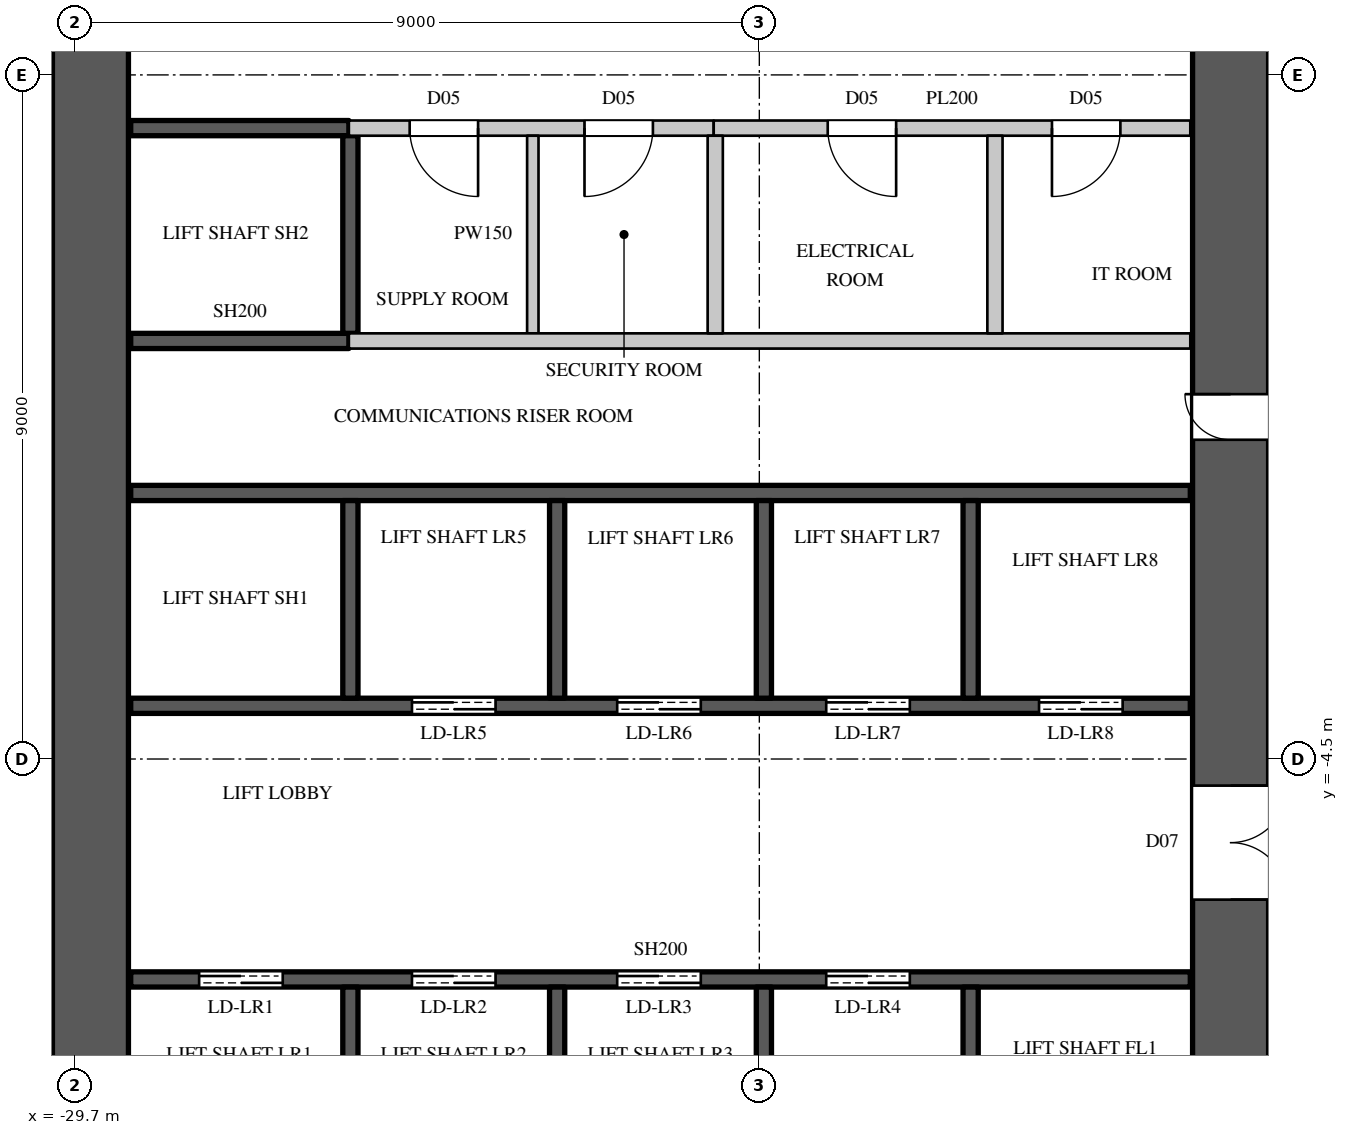
"""IFC4 building model, lengths in metres.
Left out: names, types, materials, properties, quantities, classifications, styles, units other than length and angle.
Written with IfcOpenShell. Run it as: python <this file> out.ifc"""

import sys

from ifc_helpers import new_model, si_unit, direction, frame, frame_2d, origin, place, context, subcontext, project, spatial, rectangle, extrude, element, fill, save


model = new_model("IFC4")
c1 = context("Model", 3, precision=1e-05, world=origin(), true_north=direction((0.0, 1.0)))
c2 = subcontext(c1, "Body", "Model", "MODEL_VIEW")
j1 = project(units=[si_unit("LENGTHUNIT", "METRE"), si_unit("PLANEANGLEUNIT", "RADIAN")], contexts=[c1])
p1 = place(None, origin())
s1 = spatial("IfcSite", under=j1, at=p1, CompositionType="ELEMENT")
p2 = place(p1, origin())
s2 = spatial("IfcBuilding", under=s1, at=p2, CompositionType="ELEMENT")
p3 = place(p2, frame((0.0, 0.0, 123.9)))
s3 = spatial("IfcBuildingStorey", under=s2, at=p3, CompositionType="ELEMENT", Elevation=123.9)
p4 = place(p3, frame((-14.5, -14.8, 0.0), z_axis=(0.0, 0.0, 1.0), x_axis=(0.0, 1.0, 0.0)))
e1 = element("IfcWall", 1, at=p4, inside=s3, PredefinedType="SHEAR", context=c2, shape_type="SweptSolid", body=[
    extrude(rectangle(XDim=29.6, YDim=1.0, at=frame_2d((14.8, 0.0))), origin(), (0.0, 0.0, 1.0), 3.6),
])
p5 = place(p4, frame((8.45, 0.0, 0.0)))
e2 = element("IfcOpeningElement", 2, at=p5, cuts=e1, PredefinedType="OPENING", context=c2, shape_type="SweptSolid", body=[
    extrude(rectangle(XDim=1.5, YDim=2.4, at=frame_2d((0.75, 1.2))), frame((0.0, 0.51, 0.0), z_axis=(0.0, -1.0, 0.0), x_axis=(1.0, 0.0, 0.0)), (0.0, 0.0, 1.0), 1.02),
])
p6 = place(p4, frame((19.65, 0.0, 0.0)))
e3 = element("IfcOpeningElement", 3, at=p6, cuts=e1, PredefinedType="OPENING", context=c2, shape_type="SweptSolid", body=[
    extrude(rectangle(XDim=1.5, YDim=2.4, at=frame_2d((0.75, 1.2))), frame((0.0, 0.51, 0.0), z_axis=(0.0, -1.0, 0.0), x_axis=(1.0, 0.0, 0.0)), (0.0, 0.0, 1.0), 1.02),
])
p7 = place(p4, frame((14.5, 0.0, 0.0)))
e4 = element("IfcOpeningElement", 4, at=p7, cuts=e1, PredefinedType="OPENING", context=c2, shape_type="SweptSolid", body=[
    extrude(rectangle(XDim=0.6, YDim=2.0, at=frame_2d((0.3, 1.0))), frame((0.0, 0.51, 0.0), z_axis=(0.0, -1.0, 0.0), x_axis=(1.0, 0.0, 0.0)), (0.0, 0.0, 1.0), 1.02),
])
p8 = place(p3, frame((-29.5, -10.2, 0.0), z_axis=(0.0, 0.0, 1.0), x_axis=(0.0, 1.0, 0.0)))
e5 = element("IfcWall", 5, at=p8, inside=s3, PredefinedType="SHEAR", context=c2, shape_type="SweptSolid", body=[
    extrude(rectangle(XDim=20.4, YDim=1.0, at=frame_2d((10.2, 0.0))), origin(), (0.0, 0.0, 1.0), 3.6),
])
p9 = place(p3, frame((-26.1, 3.8, 0.0), z_axis=(0.0, 0.0, 1.0), x_axis=(1.0, 0.0, 0.0)))
e6 = element("IfcWall", 6, at=p9, inside=s3, PredefinedType="PARTITIONING", context=c2, shape_type="SweptSolid", body=[
    extrude(rectangle(XDim=4.8, YDim=0.2, at=frame_2d((2.4, 0.0))), origin(), (0.0, 0.0, 1.0), 3.3),
])
p10 = place(p9, frame((0.8, 0.0, 0.0)))
e7 = element("IfcOpeningElement", 7, at=p10, cuts=e6, PredefinedType="OPENING", context=c2, shape_type="SweptSolid", body=[
    extrude(rectangle(XDim=0.9, YDim=2.2, at=frame_2d((0.45, 1.1))), frame((0.0, 0.11, 0.0), z_axis=(0.0, -1.0, 0.0), x_axis=(1.0, 0.0, 0.0)), (0.0, 0.0, 1.0), 0.22),
])
p11 = place(p9, frame((3.1, 0.0, 0.0)))
e8 = element("IfcOpeningElement", 8, at=p11, cuts=e6, PredefinedType="OPENING", context=c2, shape_type="SweptSolid", body=[
    extrude(rectangle(XDim=0.9, YDim=2.2, at=frame_2d((0.45, 1.1))), frame((0.0, 0.11, 0.0), z_axis=(0.0, -1.0, 0.0), x_axis=(1.0, 0.0, 0.0)), (0.0, 0.0, 1.0), 0.22),
])
p12 = place(p3, frame((-23.68, 1.1, 0.0), z_axis=(0.0, 0.0, 1.0), x_axis=(0.0, 1.0, 0.0)))
e9 = element("IfcWall", 9, at=p12, inside=s3, PredefinedType="PARTITIONING", context=c2, shape_type="SweptSolid", body=[
    extrude(rectangle(XDim=2.6, YDim=0.15, at=frame_2d((1.3, 0.0))), origin(), (0.0, 0.0, 1.0), 3.3),
])
p13 = place(p3, frame((-26.1, 1.0, 0.0), z_axis=(0.0, 0.0, 1.0), x_axis=(1.0, 0.0, 0.0)))
e10 = element("IfcWall", 10, at=p13, inside=s3, PredefinedType="PARTITIONING", context=c2, shape_type="SweptSolid", body=[
    extrude(rectangle(XDim=11.07, YDim=0.2, at=frame_2d((5.535, 0.0))), origin(), (0.0, 0.0, 1.0), 3.3),
])
p14 = place(p3, frame((-21.3, 3.8, 0.0), z_axis=(0.0, 0.0, 1.0), x_axis=(1.0, 0.0, 0.0)))
e11 = element("IfcWall", 11, at=p14, inside=s3, PredefinedType="PARTITIONING", context=c2, shape_type="SweptSolid", body=[
    extrude(rectangle(XDim=6.27, YDim=0.2, at=frame_2d((3.135, 0.0))), origin(), (0.0, 0.0, 1.0), 3.3),
])
p15 = place(p14, frame((1.5, 0.0, 0.0)))
e12 = element("IfcOpeningElement", 12, at=p15, cuts=e11, PredefinedType="OPENING", context=c2, shape_type="SweptSolid", body=[
    extrude(rectangle(XDim=0.9, YDim=2.2, at=frame_2d((0.45, 1.1))), frame((0.0, 0.11, 0.0), z_axis=(0.0, -1.0, 0.0), x_axis=(1.0, 0.0, 0.0)), (0.0, 0.0, 1.0), 0.22),
])
p16 = place(p14, frame((4.45, 0.0, 0.0)))
e13 = element("IfcOpeningElement", 13, at=p16, cuts=e11, PredefinedType="OPENING", context=c2, shape_type="SweptSolid", body=[
    extrude(rectangle(XDim=0.9, YDim=2.2, at=frame_2d((0.45, 1.1))), frame((0.0, 0.11, 0.0), z_axis=(0.0, -1.0, 0.0), x_axis=(1.0, 0.0, 0.0)), (0.0, 0.0, 1.0), 0.22),
])
for number, where, z_axis, x_axis in (
    (14, (-21.28, 1.1, 0.0), (0.0, 0.0, 1.0), (0.0, 1.0, 0.0)),
    (15, (-17.6, 1.1, 0.0), (0.0, 0.0, 1.0), (0.0, 1.0, 0.0)),
):
    element("IfcWall", number, at=place(p3, frame(where, z_axis=z_axis, x_axis=x_axis)), inside=s3, PredefinedType="PARTITIONING", context=c2, shape_type="SweptSolid", body=[
        extrude(rectangle(XDim=2.6, YDim=0.2, at=frame_2d((1.3, 0.0))), origin(), (0.0, 0.0, 1.0), 3.3),
    ])
p17 = place(p3, frame((-28.97, -7.4, 0.0), z_axis=(0.0, 0.0, 1.0), x_axis=(1.0, 0.0, 0.0)))
e16 = element("IfcWall", 16, at=p17, inside=s3, PredefinedType="SHEAR", context=c2, shape_type="SweptSolid", body=[
    extrude(rectangle(XDim=13.94, YDim=0.2, at=frame_2d((6.97, 0.0))), origin(), (0.0, 0.0, 1.0), 3.3),
])
p18 = place(p17, frame((0.9, 0.0, 0.0)))
e17 = element("IfcOpeningElement", 17, at=p18, cuts=e16, PredefinedType="OPENING", context=c2, shape_type="SweptSolid", body=[
    extrude(rectangle(XDim=1.1, YDim=2.2, at=frame_2d((0.55, 1.1))), frame((0.0, 0.11, 0.0), z_axis=(0.0, -1.0, 0.0), x_axis=(1.0, 0.0, 0.0)), (0.0, 0.0, 1.0), 0.22),
])
p19 = place(p17, frame((3.7, 0.0, 0.0)))
e18 = element("IfcOpeningElement", 18, at=p19, cuts=e16, PredefinedType="OPENING", context=c2, shape_type="SweptSolid", body=[
    extrude(rectangle(XDim=1.1, YDim=2.2, at=frame_2d((0.55, 1.1))), frame((0.0, 0.11, 0.0), z_axis=(0.0, -1.0, 0.0), x_axis=(1.0, 0.0, 0.0)), (0.0, 0.0, 1.0), 0.22),
])
p20 = place(p17, frame((6.4, 0.0, 0.0)))
e19 = element("IfcOpeningElement", 19, at=p20, cuts=e16, PredefinedType="OPENING", context=c2, shape_type="SweptSolid", body=[
    extrude(rectangle(XDim=1.1, YDim=2.2, at=frame_2d((0.55, 1.1))), frame((0.0, 0.11, 0.0), z_axis=(0.0, -1.0, 0.0), x_axis=(1.0, 0.0, 0.0)), (0.0, 0.0, 1.0), 0.22),
])
p21 = place(p17, frame((9.15, 0.0, 0.0)))
e20 = element("IfcOpeningElement", 20, at=p21, cuts=e16, PredefinedType="OPENING", context=c2, shape_type="SweptSolid", body=[
    extrude(rectangle(XDim=1.1, YDim=2.2, at=frame_2d((0.55, 1.1))), frame((0.0, 0.11, 0.0), z_axis=(0.0, -1.0, 0.0), x_axis=(1.0, 0.0, 0.0)), (0.0, 0.0, 1.0), 0.22),
])
p22 = place(p3, frame((-28.97, -3.8, 0.0), z_axis=(0.0, 0.0, 1.0), x_axis=(1.0, 0.0, 0.0)))
e21 = element("IfcWall", 21, at=p22, inside=s3, PredefinedType="SHEAR", context=c2, shape_type="SweptSolid", body=[
    extrude(rectangle(XDim=13.94, YDim=0.2, at=frame_2d((6.97, 0.0))), origin(), (0.0, 0.0, 1.0), 3.3),
])
p23 = place(p22, frame((3.7, 0.0, 0.0)))
e22 = element("IfcOpeningElement", 22, at=p23, cuts=e21, PredefinedType="OPENING", context=c2, shape_type="SweptSolid", body=[
    extrude(rectangle(XDim=1.1, YDim=2.2, at=frame_2d((0.55, 1.1))), frame((0.0, 0.11, 0.0), z_axis=(0.0, -1.0, 0.0), x_axis=(1.0, 0.0, 0.0)), (0.0, 0.0, 1.0), 0.22),
])
p24 = place(p22, frame((6.4, 0.0, 0.0)))
e23 = element("IfcOpeningElement", 23, at=p24, cuts=e21, PredefinedType="OPENING", context=c2, shape_type="SweptSolid", body=[
    extrude(rectangle(XDim=1.1, YDim=2.2, at=frame_2d((0.55, 1.1))), frame((0.0, 0.11, 0.0), z_axis=(0.0, -1.0, 0.0), x_axis=(1.0, 0.0, 0.0)), (0.0, 0.0, 1.0), 0.22),
])
p25 = place(p22, frame((9.15, 0.0, 0.0)))
e24 = element("IfcOpeningElement", 24, at=p25, cuts=e21, PredefinedType="OPENING", context=c2, shape_type="SweptSolid", body=[
    extrude(rectangle(XDim=1.1, YDim=2.2, at=frame_2d((0.55, 1.1))), frame((0.0, 0.11, 0.0), z_axis=(0.0, -1.0, 0.0), x_axis=(1.0, 0.0, 0.0)), (0.0, 0.0, 1.0), 0.22),
])
p26 = place(p22, frame((11.95, 0.0, 0.0)))
e25 = element("IfcOpeningElement", 25, at=p26, cuts=e21, PredefinedType="OPENING", context=c2, shape_type="SweptSolid", body=[
    extrude(rectangle(XDim=1.1, YDim=2.2, at=frame_2d((0.55, 1.1))), frame((0.0, 0.11, 0.0), z_axis=(0.0, -1.0, 0.0), x_axis=(1.0, 0.0, 0.0)), (0.0, 0.0, 1.0), 0.22),
])
p27 = place(p3, frame((-28.97, -1.0, 0.0), z_axis=(0.0, 0.0, 1.0), x_axis=(1.0, 0.0, 0.0)))
e26 = element("IfcWall", 26, at=p27, inside=s3, PredefinedType="SHEAR", context=c2, shape_type="SweptSolid", body=[
    extrude(rectangle(XDim=13.94, YDim=0.2, at=frame_2d((6.97, 0.0))), origin(), (0.0, 0.0, 1.0), 3.3),
])
for number, where, z_axis, x_axis in (
    (27, (-28.97, 1.0, 0.0), (0.0, 0.0, 1.0), (1.0, 0.0, 0.0)),
    (28, (-28.97, 3.8, 0.0), (0.0, 0.0, 1.0), (1.0, 0.0, 0.0)),
):
    element("IfcWall", number, at=place(p3, frame(where, z_axis=z_axis, x_axis=x_axis)), inside=s3, PredefinedType="SHEAR", context=c2, shape_type="SweptSolid", body=[
        extrude(rectangle(XDim=2.87, YDim=0.2, at=frame_2d((1.435, 0.0))), origin(), (0.0, 0.0, 1.0), 3.3),
    ])
p28 = place(p3, frame((-26.08, -10.075, 0.0), z_axis=(0.0, 0.0, 1.0), x_axis=(0.0, 1.0, 0.0)))
e29 = element("IfcWall", 29, at=p28, inside=s3, PredefinedType="SHEAR", context=c2, shape_type="SweptSolid", body=[
    extrude(rectangle(XDim=2.575, YDim=0.2, at=frame_2d((1.288, 0.0))), origin(), (0.0, 0.0, 1.0), 3.6),
])
p29 = place(p3, frame((-26.08, -3.7, 0.0), z_axis=(0.0, 0.0, 1.0), x_axis=(0.0, 1.0, 0.0)))
e30 = element("IfcWall", 30, at=p29, inside=s3, PredefinedType="SHEAR", context=c2, shape_type="SweptSolid", body=[
    extrude(rectangle(XDim=2.6, YDim=0.2, at=frame_2d((1.3, 0.0))), origin(), (0.0, 0.0, 1.0), 3.6),
])
p30 = place(p3, frame((-26.08, 1.1, 0.0), z_axis=(0.0, 0.0, 1.0), x_axis=(0.0, 1.0, 0.0)))
e31 = element("IfcWall", 31, at=p30, inside=s3, PredefinedType="SHEAR", context=c2, shape_type="SweptSolid", body=[
    extrude(rectangle(XDim=2.6, YDim=0.2, at=frame_2d((1.3, 0.0))), origin(), (0.0, 0.0, 1.0), 3.3),
])
p31 = place(p3, frame((-23.36, -10.075, 0.0), z_axis=(0.0, 0.0, 1.0), x_axis=(0.0, 1.0, 0.0)))
e32 = element("IfcWall", 32, at=p31, inside=s3, PredefinedType="SHEAR", context=c2, shape_type="SweptSolid", body=[
    extrude(rectangle(XDim=2.575, YDim=0.2, at=frame_2d((1.288, 0.0))), origin(), (0.0, 0.0, 1.0), 3.6),
])
p32 = place(p3, frame((-23.36, -3.7, 0.0), z_axis=(0.0, 0.0, 1.0), x_axis=(0.0, 1.0, 0.0)))
e33 = element("IfcWall", 33, at=p32, inside=s3, PredefinedType="SHEAR", context=c2, shape_type="SweptSolid", body=[
    extrude(rectangle(XDim=2.6, YDim=0.2, at=frame_2d((1.3, 0.0))), origin(), (0.0, 0.0, 1.0), 3.6),
])
p33 = place(p3, frame((-20.64, -10.075, 0.0), z_axis=(0.0, 0.0, 1.0), x_axis=(0.0, 1.0, 0.0)))
e34 = element("IfcWall", 34, at=p33, inside=s3, PredefinedType="SHEAR", context=c2, shape_type="SweptSolid", body=[
    extrude(rectangle(XDim=2.575, YDim=0.2, at=frame_2d((1.288, 0.0))), origin(), (0.0, 0.0, 1.0), 3.6),
])
p34 = place(p3, frame((-20.64, -3.7, 0.0), z_axis=(0.0, 0.0, 1.0), x_axis=(0.0, 1.0, 0.0)))
e35 = element("IfcWall", 35, at=p34, inside=s3, PredefinedType="SHEAR", context=c2, shape_type="SweptSolid", body=[
    extrude(rectangle(XDim=2.6, YDim=0.2, at=frame_2d((1.3, 0.0))), origin(), (0.0, 0.0, 1.0), 3.6),
])
p35 = place(p3, frame((-17.92, -10.1, 0.0), z_axis=(0.0, 0.0, 1.0), x_axis=(0.0, 1.0, 0.0)))
e36 = element("IfcWall", 36, at=p35, inside=s3, PredefinedType="SHEAR", context=c2, shape_type="SweptSolid", body=[
    extrude(rectangle(XDim=2.6, YDim=0.2, at=frame_2d((1.3, 0.0))), origin(), (0.0, 0.0, 1.0), 3.6),
])
p36 = place(p3, frame((-17.92, -3.7, 0.0), z_axis=(0.0, 0.0, 1.0), x_axis=(0.0, 1.0, 0.0)))
e37 = element("IfcWall", 37, at=p36, inside=s3, PredefinedType="SHEAR", context=c2, shape_type="SweptSolid", body=[
    extrude(rectangle(XDim=2.6, YDim=0.2, at=frame_2d((1.3, 0.0))), origin(), (0.0, 0.0, 1.0), 3.6),
])
p37 = place(p10, origin())
e38 = element("IfcDoor", 38, at=p37, inside=s3, OperationType="SINGLE_SWING_LEFT", PredefinedType="DOOR", context=c2, shape_type="SweptSolid", body=[
    extrude(rectangle(XDim=0.9, YDim=2.2, at=frame_2d((0.45, 1.1))), frame((0.0, 0.025, 0.0), z_axis=(0.0, -1.0, 0.0), x_axis=(1.0, 0.0, 0.0)), (0.0, 0.0, 1.0), 0.05),
])
fill(e7, e38)
p38 = place(p11, origin())
e39 = element("IfcDoor", 39, at=p38, inside=s3, OperationType="SINGLE_SWING_RIGHT", PredefinedType="DOOR", context=c2, shape_type="SweptSolid", body=[
    extrude(rectangle(XDim=0.9, YDim=2.2, at=frame_2d((0.45, 1.1))), frame((0.0, 0.025, 0.0), z_axis=(0.0, -1.0, 0.0), x_axis=(1.0, 0.0, 0.0)), (0.0, 0.0, 1.0), 0.05),
])
fill(e8, e39)
p39 = place(p15, origin())
e40 = element("IfcDoor", 40, at=p39, inside=s3, OperationType="SINGLE_SWING_LEFT", PredefinedType="DOOR", context=c2, shape_type="SweptSolid", body=[
    extrude(rectangle(XDim=0.9, YDim=2.2, at=frame_2d((0.45, 1.1))), frame((0.0, 0.025, 0.0), z_axis=(0.0, -1.0, 0.0), x_axis=(1.0, 0.0, 0.0)), (0.0, 0.0, 1.0), 0.05),
])
fill(e12, e40)
p40 = place(p16, origin())
e41 = element("IfcDoor", 41, at=p40, inside=s3, OperationType="SINGLE_SWING_RIGHT", PredefinedType="DOOR", context=c2, shape_type="SweptSolid", body=[
    extrude(rectangle(XDim=0.9, YDim=2.2, at=frame_2d((0.45, 1.1))), frame((0.0, 0.025, 0.0), z_axis=(0.0, -1.0, 0.0), x_axis=(1.0, 0.0, 0.0)), (0.0, 0.0, 1.0), 0.05),
])
fill(e13, e41)
p41 = place(p18, origin())
e42 = element("IfcDoor", 42, at=p41, inside=s3, OperationType="DOUBLE_DOOR_SLIDING", PredefinedType="DOOR", context=c2, shape_type="SweptSolid", body=[
    extrude(rectangle(XDim=1.1, YDim=2.2, at=frame_2d((0.55, 1.1))), frame((0.0, 0.025, 0.0), z_axis=(0.0, -1.0, 0.0), x_axis=(1.0, 0.0, 0.0)), (0.0, 0.0, 1.0), 0.05),
])
fill(e17, e42)
p42 = place(p19, origin())
e43 = element("IfcDoor", 43, at=p42, inside=s3, OperationType="DOUBLE_DOOR_SLIDING", PredefinedType="DOOR", context=c2, shape_type="SweptSolid", body=[
    extrude(rectangle(XDim=1.1, YDim=2.2, at=frame_2d((0.55, 1.1))), frame((0.0, 0.025, 0.0), z_axis=(0.0, -1.0, 0.0), x_axis=(1.0, 0.0, 0.0)), (0.0, 0.0, 1.0), 0.05),
])
fill(e18, e43)
p43 = place(p20, origin())
e44 = element("IfcDoor", 44, at=p43, inside=s3, OperationType="DOUBLE_DOOR_SLIDING", PredefinedType="DOOR", context=c2, shape_type="SweptSolid", body=[
    extrude(rectangle(XDim=1.1, YDim=2.2, at=frame_2d((0.55, 1.1))), frame((0.0, 0.025, 0.0), z_axis=(0.0, -1.0, 0.0), x_axis=(1.0, 0.0, 0.0)), (0.0, 0.0, 1.0), 0.05),
])
fill(e19, e44)
p44 = place(p21, origin())
e45 = element("IfcDoor", 45, at=p44, inside=s3, OperationType="DOUBLE_DOOR_SLIDING", PredefinedType="DOOR", context=c2, shape_type="SweptSolid", body=[
    extrude(rectangle(XDim=1.1, YDim=2.2, at=frame_2d((0.55, 1.1))), frame((0.0, 0.025, 0.0), z_axis=(0.0, -1.0, 0.0), x_axis=(1.0, 0.0, 0.0)), (0.0, 0.0, 1.0), 0.05),
])
fill(e20, e45)
p45 = place(p23, origin())
e46 = element("IfcDoor", 46, at=p45, inside=s3, OperationType="DOUBLE_DOOR_SLIDING", PredefinedType="DOOR", context=c2, shape_type="SweptSolid", body=[
    extrude(rectangle(XDim=1.1, YDim=2.2, at=frame_2d((0.55, 1.1))), frame((0.0, 0.025, 0.0), z_axis=(0.0, -1.0, 0.0), x_axis=(1.0, 0.0, 0.0)), (0.0, 0.0, 1.0), 0.05),
])
fill(e22, e46)
p46 = place(p24, origin())
e47 = element("IfcDoor", 47, at=p46, inside=s3, OperationType="DOUBLE_DOOR_SLIDING", PredefinedType="DOOR", context=c2, shape_type="SweptSolid", body=[
    extrude(rectangle(XDim=1.1, YDim=2.2, at=frame_2d((0.55, 1.1))), frame((0.0, 0.025, 0.0), z_axis=(0.0, -1.0, 0.0), x_axis=(1.0, 0.0, 0.0)), (0.0, 0.0, 1.0), 0.05),
])
fill(e23, e47)
p47 = place(p25, origin())
e48 = element("IfcDoor", 48, at=p47, inside=s3, OperationType="DOUBLE_DOOR_SLIDING", PredefinedType="DOOR", context=c2, shape_type="SweptSolid", body=[
    extrude(rectangle(XDim=1.1, YDim=2.2, at=frame_2d((0.55, 1.1))), frame((0.0, 0.025, 0.0), z_axis=(0.0, -1.0, 0.0), x_axis=(1.0, 0.0, 0.0)), (0.0, 0.0, 1.0), 0.05),
])
fill(e24, e48)
p48 = place(p26, origin())
e49 = element("IfcDoor", 49, at=p48, inside=s3, OperationType="DOUBLE_DOOR_SLIDING", PredefinedType="DOOR", context=c2, shape_type="SweptSolid", body=[
    extrude(rectangle(XDim=1.1, YDim=2.2, at=frame_2d((0.55, 1.1))), frame((0.0, 0.025, 0.0), z_axis=(0.0, -1.0, 0.0), x_axis=(1.0, 0.0, 0.0)), (0.0, 0.0, 1.0), 0.05),
])
fill(e25, e49)
p49 = place(p5, origin())
e50 = element("IfcDoor", 50, at=p49, inside=s3, OperationType="DOUBLE_DOOR_SINGLE_SWING", PredefinedType="DOOR", context=c2, shape_type="SweptSolid", body=[
    extrude(rectangle(XDim=1.5, YDim=2.4, at=frame_2d((0.75, 1.2))), frame((0.0, -0.445, 0.0), z_axis=(0.0, -1.0, 0.0), x_axis=(1.0, 0.0, 0.0)), (0.0, 0.0, 1.0), 0.05),
])
fill(e2, e50)
p50 = place(p7, origin())
e51 = element("IfcDoor", 51, at=p50, inside=s3, OperationType="SINGLE_SWING_RIGHT", PredefinedType="DOOR", context=c2, shape_type="SweptSolid", body=[
    extrude(rectangle(XDim=0.6, YDim=2.0, at=frame_2d((0.3, 1.0))), frame((0.0, 0.495, 0.0), z_axis=(0.0, -1.0, 0.0), x_axis=(1.0, 0.0, 0.0)), (0.0, 0.0, 1.0), 0.05),
])
fill(e4, e51)
save(model, sys.argv[1])
